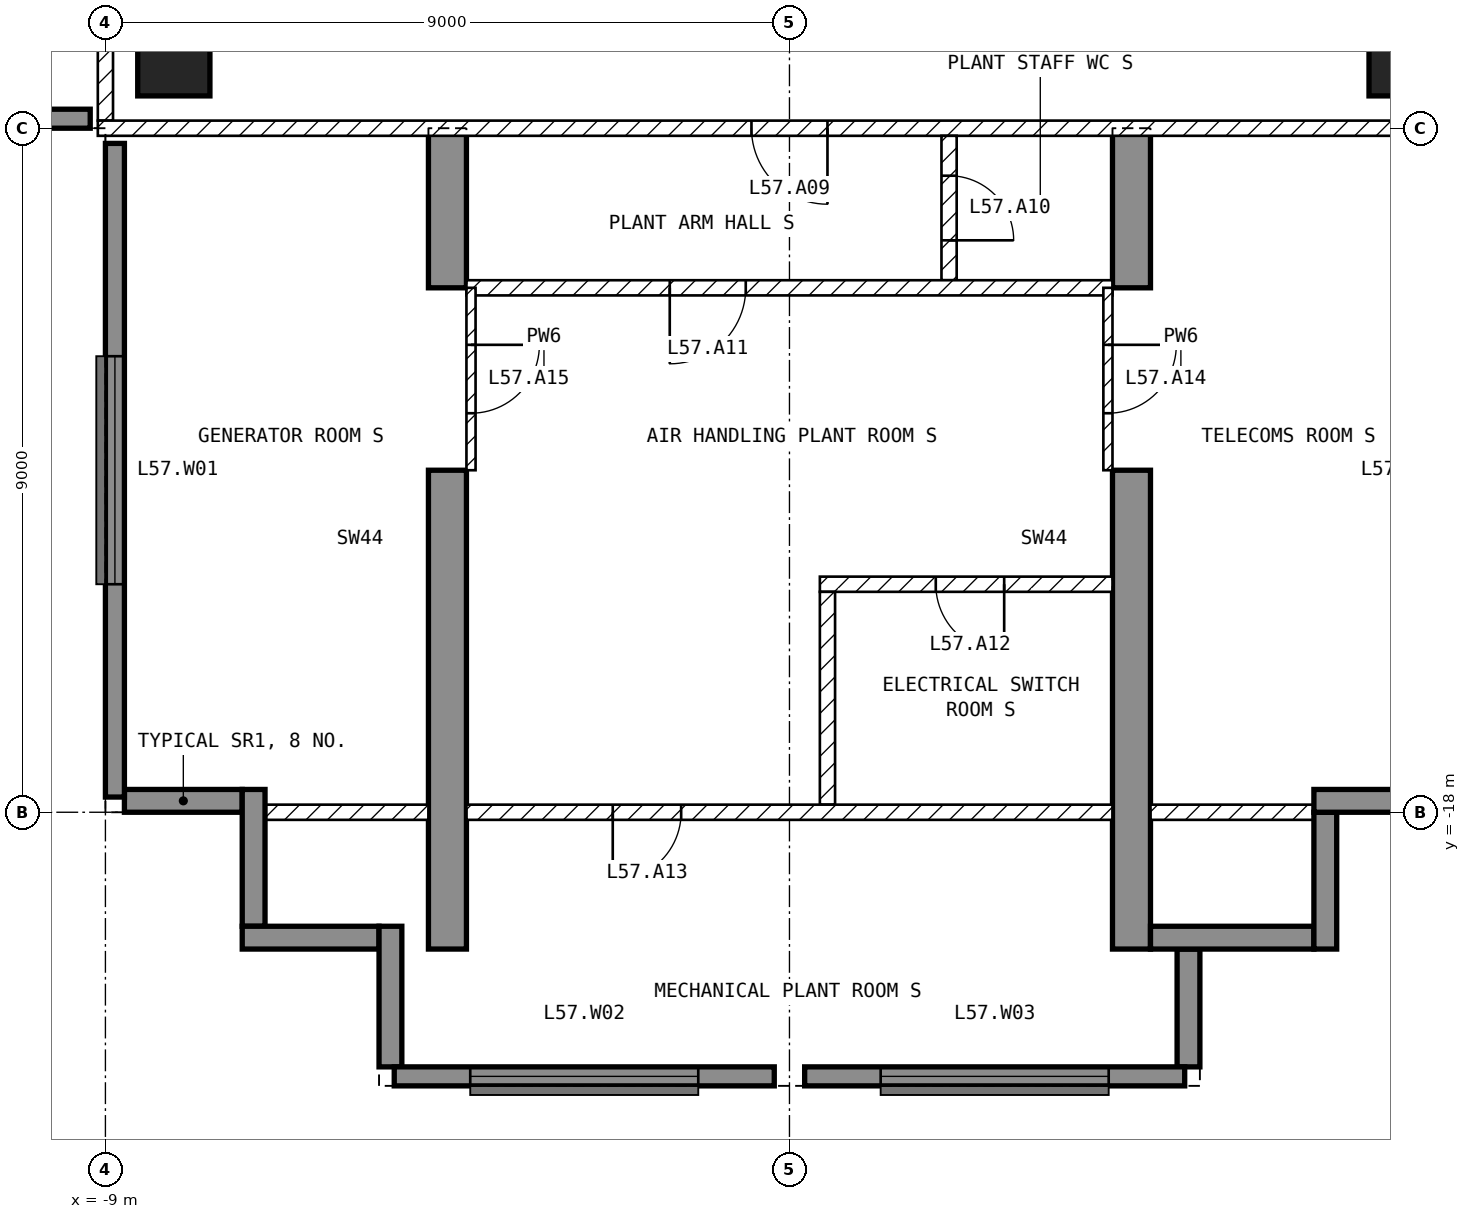
"""IFC4 building model, lengths in metres.
Left out: names, types, materials, properties, quantities, classifications, styles, units other than length and angle.
Written with IfcOpenShell. Run it as: python <this file> out.ifc"""

import sys

from ifc_helpers import new_model, si_unit, direction, frame, frame_2d, origin, origin_2d, place, context, subcontext, project, spatial, polyline, rectangle, outline, extrude, element, fill, save


model = new_model("IFC4")
c1 = context("Model", 3, precision=1e-05, world=origin(), true_north=direction((0.0, 1.0)))
c2 = subcontext(c1, "Body", "Model", "MODEL_VIEW")
j1 = project(units=[si_unit("LENGTHUNIT", "METRE"), si_unit("PLANEANGLEUNIT", "RADIAN")], contexts=[c1])
p1 = place(None, origin())
s1 = spatial("IfcSite", under=j1, at=p1, CompositionType="ELEMENT")
p2 = place(p1, origin())
s2 = spatial("IfcBuilding", under=s1, at=p2, CompositionType="ELEMENT")
p3 = place(p2, frame((0.0, 0.0, 228.0)))
s3 = spatial("IfcBuildingStorey", under=s2, at=p3, CompositionType="ELEMENT", Elevation=228.0)
for number, where, z_axis, x_axis in (
    (1, (-8.1, -8.1, -0.45), (0.0, 0.0, 1.0), (1.0, 0.0, 0.0)),
    (2, (8.1, -8.1, -0.45), (0.0, 0.0, 1.0), (1.0, 0.0, 0.0)),
):
    element("IfcColumn", number, at=place(p3, frame(where, z_axis=z_axis, x_axis=x_axis)), inside=s3, PredefinedType="COLUMN", context=c2, shape_type="SweptSolid", body=[
        extrude(rectangle(XDim=0.95, YDim=0.95, at=origin_2d()), origin(), (0.0, 0.0, 1.0), 4.7),
    ])
for number, where, z_axis, x_axis in (
    (3, (-4.75, -19.8, -0.45), (1.0, 0.0, 0.0), (0.0, 1.0, 0.0)),
    (4, (4.25, -19.8, -0.45), (1.0, 0.0, 0.0), (0.0, 1.0, 0.0)),
):
    element("IfcWall", number, at=place(p3, frame(where, z_axis=z_axis, x_axis=x_axis)), inside=s3, PredefinedType="SHEAR", context=c2, shape_type="SweptSolid", body=[
        extrude(outline(polyline([(0.0, 0.0), (6.3, 0.0), (6.3, 2.85), (8.7, 2.85), (8.7, 0.0), (10.8, 0.0), (10.8, 4.7), (0.0, 4.7), (0.0, 0.0)])), origin(), (0.0, 0.0, 1.0), 0.5),
    ])
p4 = place(p3, frame((-17.8, -8.875, 0.0), z_axis=(0.0, 0.0, 1.0), x_axis=(1.0, 0.0, 0.0)))
e5 = element("IfcWall", 5, at=p4, inside=s3, PredefinedType="SOLIDWALL", context=c2, shape_type="SweptSolid", body=[
    extrude(rectangle(XDim=8.6, YDim=0.25, at=frame_2d((4.3, 0.0))), origin(), (0.0, 0.0, 1.0), 4.25),
])
p5 = place(p3, frame((-8.875, -9.2, 0.0), z_axis=(0.0, 0.0, 1.0), x_axis=(0.0, -1.0, 0.0)))
e6 = element("IfcWall", 6, at=p5, inside=s3, PredefinedType="SOLIDWALL", context=c2, shape_type="SweptSolid", body=[
    extrude(rectangle(XDim=8.6, YDim=0.25, at=frame_2d((4.3, 0.0))), origin(), (0.0, 0.0, 1.0), 4.25),
])
p6 = place(p5, frame((2.8, 0.0, 1.0)))
e7 = element("IfcOpeningElement", 7, at=p6, cuts=e6, PredefinedType="OPENING", context=c2, shape_type="SweptSolid", body=[
    extrude(rectangle(XDim=3.0, YDim=2.4, at=frame_2d((1.5, 1.2))), frame((0.0, 0.135, 0.0), z_axis=(0.0, -1.0, 0.0), x_axis=(1.0, 0.0, 0.0)), (0.0, 0.0, 1.0), 0.27),
])
p7 = place(p3, frame((-5.2, -21.475, 0.0), z_axis=(0.0, 0.0, 1.0), x_axis=(1.0, 0.0, 0.0)))
e8 = element("IfcWall", 8, at=p7, inside=s3, PredefinedType="SOLIDWALL", context=c2, shape_type="SweptSolid", body=[
    extrude(rectangle(XDim=5.0, YDim=0.25, at=frame_2d((2.5, 0.0))), origin(), (0.0, 0.0, 1.0), 4.25),
])
p8 = place(p7, frame((1.0, 0.0, 1.0)))
e9 = element("IfcOpeningElement", 9, at=p8, cuts=e8, PredefinedType="OPENING", context=c2, shape_type="SweptSolid", body=[
    extrude(rectangle(XDim=3.0, YDim=2.4, at=frame_2d((1.5, 1.2))), frame((0.0, 0.135, 0.0), z_axis=(0.0, -1.0, 0.0), x_axis=(1.0, 0.0, 0.0)), (0.0, 0.0, 1.0), 0.27),
])
p9 = place(p3, frame((0.2, -21.475, 0.0), z_axis=(0.0, 0.0, 1.0), x_axis=(1.0, 0.0, 0.0)))
e10 = element("IfcWall", 10, at=p9, inside=s3, PredefinedType="SOLIDWALL", context=c2, shape_type="SweptSolid", body=[
    extrude(rectangle(XDim=5.0, YDim=0.25, at=frame_2d((2.5, 0.0))), origin(), (0.0, 0.0, 1.0), 4.25),
])
p10 = place(p9, frame((1.0, 0.0, 1.0)))
e11 = element("IfcOpeningElement", 11, at=p10, cuts=e10, PredefinedType="OPENING", context=c2, shape_type="SweptSolid", body=[
    extrude(rectangle(XDim=3.0, YDim=2.4, at=frame_2d((1.5, 1.2))), frame((0.0, 0.135, 0.0), z_axis=(0.0, -1.0, 0.0), x_axis=(1.0, 0.0, 0.0)), (0.0, 0.0, 1.0), 0.27),
])
p11 = place(p3, frame((5.25, -21.35, 0.0), z_axis=(0.0, 0.0, 1.0), x_axis=(0.0, 1.0, 0.0)))
e12 = element("IfcWall", 12, at=p11, inside=s3, PredefinedType="SOLIDWALL", context=c2, shape_type="SweptSolid", body=[
    extrude(rectangle(XDim=1.55, YDim=0.3, at=frame_2d((0.775, 0.0))), origin(), (0.0, 0.0, 1.0), 4.25),
])
p12 = place(p3, frame((4.75, -19.65, 0.0), z_axis=(0.0, 0.0, 1.0), x_axis=(1.0, 0.0, 0.0)))
e13 = element("IfcWall", 13, at=p12, inside=s3, PredefinedType="SOLIDWALL", context=c2, shape_type="SweptSolid", body=[
    extrude(rectangle(XDim=2.15, YDim=0.3, at=frame_2d((1.075, 0.0))), origin(), (0.0, 0.0, 1.0), 4.25),
])
p13 = place(p3, frame((7.05, -19.8, 0.0), z_axis=(0.0, 0.0, 1.0), x_axis=(0.0, 1.0, 0.0)))
e14 = element("IfcWall", 14, at=p13, inside=s3, PredefinedType="SOLIDWALL", context=c2, shape_type="SweptSolid", body=[
    extrude(rectangle(XDim=1.8, YDim=0.3, at=frame_2d((0.9, 0.0))), origin(), (0.0, 0.0, 1.0), 4.25),
])
p14 = place(p3, frame((6.9, -17.85, 0.0), z_axis=(0.0, 0.0, 1.0), x_axis=(1.0, 0.0, 0.0)))
e15 = element("IfcWall", 15, at=p14, inside=s3, PredefinedType="SOLIDWALL", context=c2, shape_type="SweptSolid", body=[
    extrude(rectangle(XDim=1.85, YDim=0.3, at=frame_2d((0.925, 0.0))), origin(), (0.0, 0.0, 1.0), 4.25),
])
p15 = place(p3, frame((-8.75, -17.85, 0.0), z_axis=(0.0, 0.0, 1.0), x_axis=(1.0, 0.0, 0.0)))
e16 = element("IfcWall", 16, at=p15, inside=s3, PredefinedType="SOLIDWALL", context=c2, shape_type="SweptSolid", body=[
    extrude(rectangle(XDim=1.55, YDim=0.3, at=frame_2d((0.775, 0.0))), origin(), (0.0, 0.0, 1.0), 4.25),
])
for number, where, z_axis, x_axis in (
    (17, (-7.05, -17.7, 0.0), (0.0, 0.0, 1.0), (0.0, -1.0, 0.0)),
    (18, (-7.2, -19.65, 0.0), (0.0, 0.0, 1.0), (1.0, 0.0, 0.0)),
):
    element("IfcWall", number, at=place(p3, frame(where, z_axis=z_axis, x_axis=x_axis)), inside=s3, PredefinedType="SOLIDWALL", context=c2, shape_type="SweptSolid", body=[
        extrude(rectangle(XDim=1.8, YDim=0.3, at=frame_2d((0.9, 0.0))), origin(), (0.0, 0.0, 1.0), 4.25),
    ])
p16 = place(p3, frame((-5.25, -19.5, 0.0), z_axis=(0.0, 0.0, 1.0), x_axis=(0.0, -1.0, 0.0)))
e19 = element("IfcWall", 19, at=p16, inside=s3, PredefinedType="SOLIDWALL", context=c2, shape_type="SweptSolid", body=[
    extrude(rectangle(XDim=1.85, YDim=0.3, at=frame_2d((0.925, 0.0))), origin(), (0.0, 0.0, 1.0), 4.25),
])
p17 = place(p3, frame((-9.0, -8.9, 0.0), z_axis=(0.0, 0.0, 1.0), x_axis=(0.0, 1.0, 0.0)))
e20 = element("IfcWall", 20, at=p17, inside=s3, PredefinedType="PARTITIONING", context=c2, shape_type="SweptSolid", body=[
    extrude(rectangle(XDim=7.6, YDim=0.2, at=frame_2d((3.8, 0.0))), origin(), (0.0, 0.0, 1.0), 4.25),
])
p18 = place(p3, frame((9.1, -9.0, 0.0), z_axis=(0.0, 0.0, 1.0), x_axis=(-1.0, 0.0, 0.0)))
e21 = element("IfcWall", 21, at=p18, inside=s3, PredefinedType="PARTITIONING", context=c2, shape_type="SweptSolid", body=[
    extrude(rectangle(XDim=18.2, YDim=0.2, at=frame_2d((9.1, 0.0))), origin(), (0.0, 0.0, 1.0), 4.25),
])
p19 = place(p18, frame((8.6, 0.0, 0.0)))
e22 = element("IfcOpeningElement", 22, at=p19, cuts=e21, PredefinedType="OPENING", context=c2, shape_type="SweptSolid", body=[
    extrude(rectangle(XDim=1.0, YDim=2.1, at=frame_2d((0.5, 1.05))), frame((0.0, 0.11, 0.0), z_axis=(0.0, -1.0, 0.0), x_axis=(1.0, 0.0, 0.0)), (0.0, 0.0, 1.0), 0.22),
])
p20 = place(p3, frame((2.1, -9.1, 0.0), z_axis=(0.0, 0.0, 1.0), x_axis=(0.0, -1.0, 0.0)))
e23 = element("IfcWall", 23, at=p20, inside=s3, PredefinedType="PARTITIONING", context=c2, shape_type="SweptSolid", body=[
    extrude(rectangle(XDim=1.9, YDim=0.2, at=frame_2d((0.95, 0.0))), origin(), (0.0, 0.0, 1.0), 4.25),
])
p21 = place(p20, frame((0.525, 0.0, 0.0)))
e24 = element("IfcOpeningElement", 24, at=p21, cuts=e23, PredefinedType="OPENING", context=c2, shape_type="SweptSolid", body=[
    extrude(rectangle(XDim=0.85, YDim=2.1, at=frame_2d((0.425, 1.05))), frame((0.0, 0.11, 0.0), z_axis=(0.0, -1.0, 0.0), x_axis=(1.0, 0.0, 0.0)), (0.0, 0.0, 1.0), 0.22),
])
p22 = place(p3, frame((4.25, -11.1, 0.0), z_axis=(0.0, 0.0, 1.0), x_axis=(-1.0, 0.0, 0.0)))
e25 = element("IfcWall", 25, at=p22, inside=s3, PredefinedType="PARTITIONING", context=c2, shape_type="SweptSolid", body=[
    extrude(rectangle(XDim=8.5, YDim=0.2, at=frame_2d((4.25, 0.0))), origin(), (0.0, 0.0, 1.0), 4.25),
])
p23 = place(p22, frame((4.825, 0.0, 0.0)))
e26 = element("IfcOpeningElement", 26, at=p23, cuts=e25, PredefinedType="OPENING", context=c2, shape_type="SweptSolid", body=[
    extrude(rectangle(XDim=1.0, YDim=2.1, at=frame_2d((0.5, 1.05))), frame((0.0, 0.11, 0.0), z_axis=(0.0, -1.0, 0.0), x_axis=(1.0, 0.0, 0.0)), (0.0, 0.0, 1.0), 0.22),
])
p24 = place(p3, frame((4.25, -15.0, 0.0), z_axis=(0.0, 0.0, 1.0), x_axis=(-1.0, 0.0, 0.0)))
e27 = element("IfcWall", 27, at=p24, inside=s3, PredefinedType="PARTITIONING", context=c2, shape_type="SweptSolid", body=[
    extrude(rectangle(XDim=3.85, YDim=0.2, at=frame_2d((1.925, 0.0))), origin(), (0.0, 0.0, 1.0), 4.25),
])
p25 = place(p24, frame((1.425, 0.0, 0.0)))
e28 = element("IfcOpeningElement", 28, at=p25, cuts=e27, PredefinedType="OPENING", context=c2, shape_type="SweptSolid", body=[
    extrude(rectangle(XDim=0.9, YDim=2.1, at=frame_2d((0.45, 1.05))), frame((0.0, 0.11, 0.0), z_axis=(0.0, -1.0, 0.0), x_axis=(1.0, 0.0, 0.0)), (0.0, 0.0, 1.0), 0.22),
])
p26 = place(p3, frame((0.5, -15.1, 0.0), z_axis=(0.0, 0.0, 1.0), x_axis=(0.0, -1.0, 0.0)))
e29 = element("IfcWall", 29, at=p26, inside=s3, PredefinedType="PARTITIONING", context=c2, shape_type="SweptSolid", body=[
    extrude(rectangle(XDim=2.8, YDim=0.2, at=frame_2d((1.4, 0.0))), origin(), (0.0, 0.0, 1.0), 4.25),
])
p27 = place(p3, frame((4.25, -18.0, 0.0), z_axis=(0.0, 0.0, 1.0), x_axis=(-1.0, 0.0, 0.0)))
e30 = element("IfcWall", 30, at=p27, inside=s3, PredefinedType="PARTITIONING", context=c2, shape_type="SweptSolid", body=[
    extrude(rectangle(XDim=8.5, YDim=0.2, at=frame_2d((4.25, 0.0))), origin(), (0.0, 0.0, 1.0), 4.25),
])
p28 = place(p27, frame((5.675, 0.0, 0.0)))
e31 = element("IfcOpeningElement", 31, at=p28, cuts=e30, PredefinedType="OPENING", context=c2, shape_type="SweptSolid", body=[
    extrude(rectangle(XDim=0.9, YDim=2.1, at=frame_2d((0.45, 1.05))), frame((0.0, 0.11, 0.0), z_axis=(0.0, -1.0, 0.0), x_axis=(1.0, 0.0, 0.0)), (0.0, 0.0, 1.0), 0.22),
])
for number, where, z_axis, x_axis in (
    (32, (6.9, -18.0, 0.0), (0.0, 0.0, 1.0), (-1.0, 0.0, 0.0)),
    (33, (-4.75, -18.0, 0.0), (0.0, 0.0, 1.0), (-1.0, 0.0, 0.0)),
):
    element("IfcWall", number, at=place(p3, frame(where, z_axis=z_axis, x_axis=x_axis)), inside=s3, PredefinedType="PARTITIONING", context=c2, shape_type="SweptSolid", body=[
        extrude(rectangle(XDim=2.15, YDim=0.2, at=frame_2d((1.075, 0.0))), origin(), (0.0, 0.0, 1.0), 4.25),
    ])
p29 = place(p3, frame((4.19, -11.1, 0.0), z_axis=(0.0, 0.0, 1.0), x_axis=(0.0, -1.0, 0.0)))
e34 = element("IfcWall", 34, at=p29, inside=s3, PredefinedType="PARTITIONING", context=c2, shape_type="SweptSolid", body=[
    extrude(rectangle(XDim=2.4, YDim=0.12, at=frame_2d((1.2, 0.0))), origin(), (0.0, 0.0, 1.0), 2.4),
])
p30 = place(p29, frame((0.75, 0.0, 0.0)))
e35 = element("IfcOpeningElement", 35, at=p30, cuts=e34, PredefinedType="OPENING", context=c2, shape_type="SweptSolid", body=[
    extrude(rectangle(XDim=0.9, YDim=2.1, at=frame_2d((0.45, 1.05))), frame((0.0, 0.07, 0.0), z_axis=(0.0, -1.0, 0.0), x_axis=(1.0, 0.0, 0.0)), (0.0, 0.0, 1.0), 0.14),
])
p31 = place(p3, frame((-4.19, -11.1, 0.0), z_axis=(0.0, 0.0, 1.0), x_axis=(0.0, -1.0, 0.0)))
e36 = element("IfcWall", 36, at=p31, inside=s3, PredefinedType="PARTITIONING", context=c2, shape_type="SweptSolid", body=[
    extrude(rectangle(XDim=2.4, YDim=0.12, at=frame_2d((1.2, 0.0))), origin(), (0.0, 0.0, 1.0), 2.4),
])
p32 = place(p31, frame((0.75, 0.0, 0.0)))
e37 = element("IfcOpeningElement", 37, at=p32, cuts=e36, PredefinedType="OPENING", context=c2, shape_type="SweptSolid", body=[
    extrude(rectangle(XDim=0.9, YDim=2.1, at=frame_2d((0.45, 1.05))), frame((0.0, 0.07, 0.0), z_axis=(0.0, -1.0, 0.0), x_axis=(1.0, 0.0, 0.0)), (0.0, 0.0, 1.0), 0.14),
])
p33 = place(p6, origin())
e38 = element("IfcWindow", 38, at=p33, inside=s3, PartitioningType="SINGLE_PANEL", PredefinedType="WINDOW", context=c2, shape_type="SweptSolid", body=[
    extrude(rectangle(XDim=3.0, YDim=2.4, at=frame_2d((1.5, 1.2))), frame((0.0, 0.03, 0.0), z_axis=(0.0, -1.0, 0.0), x_axis=(1.0, 0.0, 0.0)), (0.0, 0.0, 1.0), 0.06),
])
fill(e7, e38)
p34 = place(p8, origin())
e39 = element("IfcWindow", 39, at=p34, inside=s3, PartitioningType="SINGLE_PANEL", PredefinedType="WINDOW", context=c2, shape_type="SweptSolid", body=[
    extrude(rectangle(XDim=3.0, YDim=2.4, at=frame_2d((1.5, 1.2))), frame((0.0, 0.03, 0.0), z_axis=(0.0, -1.0, 0.0), x_axis=(1.0, 0.0, 0.0)), (0.0, 0.0, 1.0), 0.06),
])
fill(e9, e39)
p35 = place(p10, origin())
e40 = element("IfcWindow", 40, at=p35, inside=s3, PartitioningType="SINGLE_PANEL", PredefinedType="WINDOW", context=c2, shape_type="SweptSolid", body=[
    extrude(rectangle(XDim=3.0, YDim=2.4, at=frame_2d((1.5, 1.2))), frame((0.0, 0.03, 0.0), z_axis=(0.0, -1.0, 0.0), x_axis=(1.0, 0.0, 0.0)), (0.0, 0.0, 1.0), 0.06),
])
fill(e11, e40)
p36 = place(p19, origin())
e41 = element("IfcDoor", 41, at=p36, inside=s3, OperationType="SINGLE_SWING_LEFT", PredefinedType="DOOR", context=c2, shape_type="SweptSolid", body=[
    extrude(rectangle(XDim=1.0, YDim=2.1, at=frame_2d((0.5, 1.05))), frame((0.0, 0.025, 0.0), z_axis=(0.0, -1.0, 0.0), x_axis=(1.0, 0.0, 0.0)), (0.0, 0.0, 1.0), 0.05),
])
fill(e22, e41)
p37 = place(p21, origin())
e42 = element("IfcDoor", 42, at=p37, inside=s3, OperationType="SINGLE_SWING_RIGHT", PredefinedType="DOOR", context=c2, shape_type="SweptSolid", body=[
    extrude(rectangle(XDim=0.85, YDim=2.1, at=frame_2d((0.425, 1.05))), frame((0.0, 0.025, 0.0), z_axis=(0.0, -1.0, 0.0), x_axis=(1.0, 0.0, 0.0)), (0.0, 0.0, 1.0), 0.05),
])
fill(e24, e42)
p38 = place(p23, origin())
e43 = element("IfcDoor", 43, at=p38, inside=s3, OperationType="SINGLE_SWING_RIGHT", PredefinedType="DOOR", context=c2, shape_type="SweptSolid", body=[
    extrude(rectangle(XDim=1.0, YDim=2.1, at=frame_2d((0.5, 1.05))), frame((0.0, 0.025, 0.0), z_axis=(0.0, -1.0, 0.0), x_axis=(1.0, 0.0, 0.0)), (0.0, 0.0, 1.0), 0.05),
])
fill(e26, e43)
p39 = place(p25, origin())
e44 = element("IfcDoor", 44, at=p39, inside=s3, OperationType="SINGLE_SWING_LEFT", PredefinedType="DOOR", context=c2, shape_type="SweptSolid", body=[
    extrude(rectangle(XDim=0.9, YDim=2.1, at=frame_2d((0.45, 1.05))), frame((0.0, 0.025, 0.0), z_axis=(0.0, -1.0, 0.0), x_axis=(1.0, 0.0, 0.0)), (0.0, 0.0, 1.0), 0.05),
])
fill(e28, e44)
p40 = place(p28, origin())
e45 = element("IfcDoor", 45, at=p40, inside=s3, OperationType="SINGLE_SWING_RIGHT", PredefinedType="DOOR", context=c2, shape_type="SweptSolid", body=[
    extrude(rectangle(XDim=0.9, YDim=2.1, at=frame_2d((0.45, 1.05))), frame((0.0, 0.025, 0.0), z_axis=(0.0, -1.0, 0.0), x_axis=(1.0, 0.0, 0.0)), (0.0, 0.0, 1.0), 0.05),
])
fill(e31, e45)
p41 = place(p30, origin())
e46 = element("IfcDoor", 46, at=p41, inside=s3, OperationType="SINGLE_SWING_LEFT", PredefinedType="DOOR", context=c2, shape_type="SweptSolid", body=[
    extrude(rectangle(XDim=0.9, YDim=2.1, at=frame_2d((0.45, 1.05))), frame((0.0, 0.025, 0.0), z_axis=(0.0, -1.0, 0.0), x_axis=(1.0, 0.0, 0.0)), (0.0, 0.0, 1.0), 0.05),
])
fill(e35, e46)
p42 = place(p32, origin())
e47 = element("IfcDoor", 47, at=p42, inside=s3, OperationType="SINGLE_SWING_LEFT", PredefinedType="DOOR", context=c2, shape_type="SweptSolid", body=[
    extrude(rectangle(XDim=0.9, YDim=2.1, at=frame_2d((0.45, 1.05))), frame((0.0, 0.025, 0.0), z_axis=(0.0, -1.0, 0.0), x_axis=(1.0, 0.0, 0.0)), (0.0, 0.0, 1.0), 0.05),
])
fill(e37, e47)
save(model, sys.argv[1])
